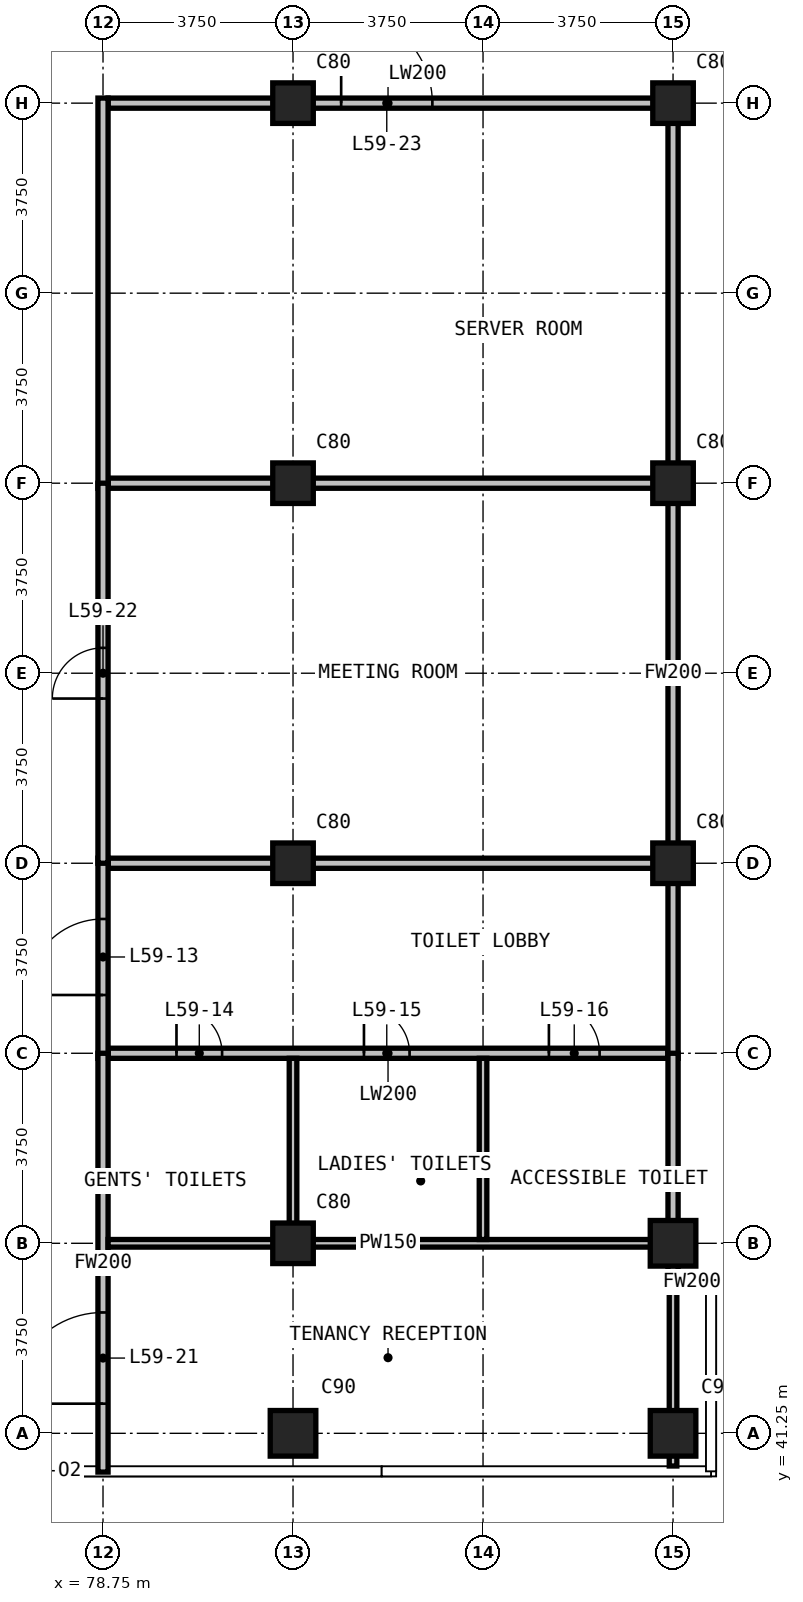
"""IFC4 building model, lengths in metres.
Left out: names, types, materials, properties, quantities, classifications, styles, units other than length and angle.
Written with IfcOpenShell. Run it as: python <this file> out.ifc"""

import sys

from ifc_helpers import new_model, si_unit, direction, frame, frame_2d, origin, origin_2d, place, context, subcontext, project, spatial, rectangle, extrude, element, fill, save


model = new_model("IFC4")
c1 = context("Model", 3, precision=1e-05, world=origin(), true_north=direction((0.0, 1.0)))
c2 = subcontext(c1, "Body", "Model", "MODEL_VIEW")
j1 = project(units=[si_unit("LENGTHUNIT", "METRE"), si_unit("PLANEANGLEUNIT", "RADIAN")], contexts=[c1])
p1 = place(None, origin())
s1 = spatial("IfcSite", under=j1, at=p1, CompositionType="ELEMENT")
p2 = place(p1, origin())
s2 = spatial("IfcBuilding", under=s1, at=p2, CompositionType="ELEMENT")
p3 = place(p2, frame((0.0, 0.0, 228.3)))
s3 = spatial("IfcBuildingStorey", under=s2, at=p3, CompositionType="ELEMENT", Elevation=228.3)
p4 = place(p3, frame((82.5, 41.25, 0.0), z_axis=(0.0, 0.0, 1.0), x_axis=(1.0, 0.0, 0.0)))
e1 = element("IfcColumn", 1, at=p4, inside=s3, PredefinedType="COLUMN", context=c2, shape_type="SweptSolid", body=[
    extrude(rectangle(XDim=0.9, YDim=0.9, at=origin_2d()), origin(), (0.0, 0.0, 1.0), 3.6),
])
for number, where, z_axis, x_axis in (
    (2, (82.5, 45.0, 0.0), (0.0, 0.0, 1.0), (1.0, 0.0, 0.0)),
    (3, (82.5, 52.5, 0.0), (0.0, 0.0, 1.0), (1.0, 0.0, 0.0)),
    (4, (82.5, 60.0, 0.0), (0.0, 0.0, 1.0), (1.0, 0.0, 0.0)),
    (5, (82.5, 67.5, 0.0), (0.0, 0.0, 1.0), (1.0, 0.0, 0.0)),
):
    element("IfcColumn", number, at=place(p3, frame(where, z_axis=z_axis, x_axis=x_axis)), inside=s3, PredefinedType="COLUMN", context=c2, shape_type="SweptSolid", body=[
        extrude(rectangle(XDim=0.8, YDim=0.8, at=origin_2d()), origin(), (0.0, 0.0, 1.0), 3.6),
    ])
for number, where, z_axis, x_axis in (
    (6, (90.0, 41.25, 0.0), (0.0, 0.0, 1.0), (1.0, 0.0, 0.0)),
    (7, (90.0, 45.0, 0.0), (0.0, 0.0, 1.0), (1.0, 0.0, 0.0)),
):
    element("IfcColumn", number, at=place(p3, frame(where, z_axis=z_axis, x_axis=x_axis)), inside=s3, PredefinedType="COLUMN", context=c2, shape_type="SweptSolid", body=[
        extrude(rectangle(XDim=0.9, YDim=0.9, at=origin_2d()), origin(), (0.0, 0.0, 1.0), 3.6),
    ])
for number, where, z_axis, x_axis in (
    (8, (90.0, 52.5, 0.0), (0.0, 0.0, 1.0), (1.0, 0.0, 0.0)),
    (9, (90.0, 60.0, 0.0), (0.0, 0.0, 1.0), (1.0, 0.0, 0.0)),
    (10, (90.0, 67.5, 0.0), (0.0, 0.0, 1.0), (1.0, 0.0, 0.0)),
):
    element("IfcColumn", number, at=place(p3, frame(where, z_axis=z_axis, x_axis=x_axis)), inside=s3, PredefinedType="COLUMN", context=c2, shape_type="SweptSolid", body=[
        extrude(rectangle(XDim=0.8, YDim=0.8, at=origin_2d()), origin(), (0.0, 0.0, 1.0), 3.6),
    ])
p5 = place(p3, frame((78.85, 48.75, 0.0), z_axis=(0.0, 0.0, 1.0), x_axis=(1.0, 0.0, 0.0)))
e11 = element("IfcWall", 11, at=p5, inside=s3, PredefinedType="PARTITIONING", context=c2, shape_type="SweptSolid", body=[
    extrude(rectangle(XDim=11.05, YDim=0.2, at=frame_2d((5.525, 0.0))), origin(), (0.0, 0.0, 1.0), 3.3),
])
p6 = place(p5, frame((1.35, 0.0, 0.0)))
e12 = element("IfcOpeningElement", 12, at=p6, cuts=e11, PredefinedType="OPENING", context=c2, shape_type="SweptSolid", body=[
    extrude(rectangle(XDim=0.9, YDim=2.2, at=frame_2d((0.45, 1.1))), frame((0.0, 0.11, 0.0), z_axis=(0.0, -1.0, 0.0), x_axis=(1.0, 0.0, 0.0)), (0.0, 0.0, 1.0), 0.22),
])
p7 = place(p5, frame((5.05, 0.0, 0.0)))
e13 = element("IfcOpeningElement", 13, at=p7, cuts=e11, PredefinedType="OPENING", context=c2, shape_type="SweptSolid", body=[
    extrude(rectangle(XDim=0.9, YDim=2.2, at=frame_2d((0.45, 1.1))), frame((0.0, 0.11, 0.0), z_axis=(0.0, -1.0, 0.0), x_axis=(1.0, 0.0, 0.0)), (0.0, 0.0, 1.0), 0.22),
])
p8 = place(p5, frame((8.7, 0.0, 0.0)))
e14 = element("IfcOpeningElement", 14, at=p8, cuts=e11, PredefinedType="OPENING", context=c2, shape_type="SweptSolid", body=[
    extrude(rectangle(XDim=1.0, YDim=2.2, at=frame_2d((0.5, 1.1))), frame((0.0, 0.11, 0.0), z_axis=(0.0, -1.0, 0.0), x_axis=(1.0, 0.0, 0.0)), (0.0, 0.0, 1.0), 0.22),
])
for number, where, z_axis, x_axis in (
    (15, (78.85, 52.5, 0.0), (0.0, 0.0, 1.0), (1.0, 0.0, 0.0)),
    (16, (78.85, 60.0, 0.0), (0.0, 0.0, 1.0), (1.0, 0.0, 0.0)),
):
    element("IfcWall", number, at=place(p3, frame(where, z_axis=z_axis, x_axis=x_axis)), inside=s3, PredefinedType="PARTITIONING", context=c2, shape_type="SweptSolid", body=[
        extrude(rectangle(XDim=11.05, YDim=0.2, at=frame_2d((5.525, 0.0))), origin(), (0.0, 0.0, 1.0), 3.3),
    ])
p9 = place(p3, frame((78.85, 67.5, 0.0), z_axis=(0.0, 0.0, 1.0), x_axis=(1.0, 0.0, 0.0)))
e17 = element("IfcWall", 17, at=p9, inside=s3, PredefinedType="PARTITIONING", context=c2, shape_type="SweptSolid", body=[
    extrude(rectangle(XDim=11.05, YDim=0.2, at=frame_2d((5.525, 0.0))), origin(), (0.0, 0.0, 1.0), 3.3),
])
p10 = place(p9, frame((4.6, 0.0, 0.0)))
e18 = element("IfcOpeningElement", 18, at=p10, cuts=e17, PredefinedType="OPENING", context=c2, shape_type="SweptSolid", body=[
    extrude(rectangle(XDim=1.8, YDim=2.4, at=frame_2d((0.9, 1.2))), frame((0.0, 0.11, 0.0), z_axis=(0.0, -1.0, 0.0), x_axis=(1.0, 0.0, 0.0)), (0.0, 0.0, 1.0), 0.22),
])
p11 = place(p3, frame((78.75, 48.65, 0.0), z_axis=(0.0, 0.0, 1.0), x_axis=(0.0, 1.0, 0.0)))
e19 = element("IfcWall", 19, at=p11, inside=s3, PredefinedType="PARTITIONING", context=c2, shape_type="SweptSolid", body=[
    extrude(rectangle(XDim=3.95, YDim=0.2, at=frame_2d((1.975, 0.0))), origin(), (0.0, 0.0, 1.0), 3.3),
])
p12 = place(p11, frame((1.25, 0.0, 0.0)))
e20 = element("IfcOpeningElement", 20, at=p12, cuts=e19, PredefinedType="OPENING", context=c2, shape_type="SweptSolid", body=[
    extrude(rectangle(XDim=1.5, YDim=2.2, at=frame_2d((0.75, 1.1))), frame((0.0, 0.11, 0.0), z_axis=(0.0, -1.0, 0.0), x_axis=(1.0, 0.0, 0.0)), (0.0, 0.0, 1.0), 0.22),
])
p13 = place(p3, frame((78.75, 59.9, 0.0), z_axis=(0.0, 0.0, 1.0), x_axis=(0.0, 1.0, 0.0)))
e21 = element("IfcWall", 21, at=p13, inside=s3, PredefinedType="PARTITIONING", context=c2, shape_type="SweptSolid", body=[
    extrude(rectangle(XDim=7.7, YDim=0.2, at=frame_2d((3.85, 0.0))), origin(), (0.0, 0.0, 1.0), 3.3),
])
p14 = place(p3, frame((90.0, 48.65, 0.0), z_axis=(0.0, 0.0, 1.0), x_axis=(0.0, 1.0, 0.0)))
e22 = element("IfcWall", 22, at=p14, inside=s3, PredefinedType="PARTITIONING", context=c2, shape_type="SweptSolid", body=[
    extrude(rectangle(XDim=3.95, YDim=0.2, at=frame_2d((1.975, 0.0))), origin(), (0.0, 0.0, 1.0), 3.3),
])
p15 = place(p3, frame((90.0, 59.9, 0.0), z_axis=(0.0, 0.0, 1.0), x_axis=(0.0, 1.0, 0.0)))
e23 = element("IfcWall", 23, at=p15, inside=s3, PredefinedType="PARTITIONING", context=c2, shape_type="SweptSolid", body=[
    extrude(rectangle(XDim=7.7, YDim=0.2, at=frame_2d((3.85, 0.0))), origin(), (0.0, 0.0, 1.0), 3.3),
])
p16 = place(p3, frame((90.1, 44.235, 0.0), z_axis=(0.0, 0.0, 1.0), x_axis=(1.0, 0.0, 0.0)))
e24 = element("IfcWall", 24, at=p16, inside=s3, PredefinedType="PARTITIONING", context=c2, shape_type="SweptSolid", body=[
    extrude(rectangle(XDim=0.545, YDim=0.2, at=frame_2d((0.272, 0.0))), origin(), (0.0, 0.0, 1.0), 3.3),
])
p17 = place(p3, frame((78.75, 40.485, 0.0), z_axis=(0.0, 0.0, 1.0), x_axis=(0.0, 1.0, 0.0)))
e25 = element("IfcWall", 25, at=p17, inside=s3, PredefinedType="PARTITIONING", context=c2, shape_type="SweptSolid", body=[
    extrude(rectangle(XDim=8.265, YDim=0.2, at=frame_2d((4.132, 0.0))), origin(), (0.0, 0.0, 1.0), 3.3),
])
p18 = place(p17, frame((1.35, 0.0, 0.0)))
e26 = element("IfcOpeningElement", 26, at=p18, cuts=e25, PredefinedType="OPENING", context=c2, shape_type="SweptSolid", body=[
    extrude(rectangle(XDim=1.8, YDim=2.2, at=frame_2d((0.9, 1.1))), frame((0.0, 0.11, 0.0), z_axis=(0.0, -1.0, 0.0), x_axis=(1.0, 0.0, 0.0)), (0.0, 0.0, 1.0), 0.22),
])
p19 = place(p3, frame((78.75, 52.5, 0.0), z_axis=(0.0, 0.0, 1.0), x_axis=(0.0, 1.0, 0.0)))
e27 = element("IfcWall", 27, at=p19, inside=s3, PredefinedType="PARTITIONING", context=c2, shape_type="SweptSolid", body=[
    extrude(rectangle(XDim=7.5, YDim=0.2, at=frame_2d((3.75, 0.0))), origin(), (0.0, 0.0, 1.0), 3.3),
])
p20 = place(p19, frame((3.25, 0.0, 0.0)))
e28 = element("IfcOpeningElement", 28, at=p20, cuts=e27, PredefinedType="OPENING", context=c2, shape_type="SweptSolid", body=[
    extrude(rectangle(XDim=1.0, YDim=2.2, at=frame_2d((0.5, 1.1))), frame((0.0, 0.11, 0.0), z_axis=(0.0, -1.0, 0.0), x_axis=(1.0, 0.0, 0.0)), (0.0, 0.0, 1.0), 0.22),
])
p21 = place(p3, frame((90.0, 44.135, 0.0), z_axis=(0.0, 0.0, 1.0), x_axis=(0.0, 1.0, 0.0)))
e29 = element("IfcWall", 29, at=p21, inside=s3, PredefinedType="PARTITIONING", context=c2, shape_type="SweptSolid", body=[
    extrude(rectangle(XDim=4.615, YDim=0.2, at=frame_2d((2.308, 0.0))), origin(), (0.0, 0.0, 1.0), 3.3),
])
p22 = place(p3, frame((90.0, 52.5, 0.0), z_axis=(0.0, 0.0, 1.0), x_axis=(0.0, 1.0, 0.0)))
e30 = element("IfcWall", 30, at=p22, inside=s3, PredefinedType="PARTITIONING", context=c2, shape_type="SweptSolid", body=[
    extrude(rectangle(XDim=7.5, YDim=0.2, at=frame_2d((3.75, 0.0))), origin(), (0.0, 0.0, 1.0), 3.3),
])
p23 = place(p3, frame((78.85, 45.0, 0.0), z_axis=(0.0, 0.0, 1.0), x_axis=(1.0, 0.0, 0.0)))
e31 = element("IfcWall", 31, at=p23, inside=s3, PredefinedType="PARTITIONING", context=c2, shape_type="SweptSolid", body=[
    extrude(rectangle(XDim=11.05, YDim=0.15, at=frame_2d((5.525, 0.0))), origin(), (0.0, 0.0, 1.0), 3.3),
])
for number, where, z_axis, x_axis in (
    (32, (82.5, 45.075, 0.0), (0.0, 0.0, 1.0), (0.0, 1.0, 0.0)),
    (33, (86.25, 45.075, 0.0), (0.0, 0.0, 1.0), (0.0, 1.0, 0.0)),
):
    element("IfcWall", number, at=place(p3, frame(where, z_axis=z_axis, x_axis=x_axis)), inside=s3, PredefinedType="PARTITIONING", context=c2, shape_type="SweptSolid", body=[
        extrude(rectangle(XDim=3.575, YDim=0.15, at=frame_2d((1.788, 0.0))), origin(), (0.0, 0.0, 1.0), 3.3),
    ])
p24 = place(p3, frame((90.0, 40.605, 0.0), z_axis=(0.0, 0.0, 1.0), x_axis=(0.0, 1.0, 0.0)))
e34 = element("IfcWall", 34, at=p24, inside=s3, PredefinedType="PARTITIONING", context=c2, shape_type="SweptSolid", body=[
    extrude(rectangle(XDim=3.6, YDim=0.15, at=frame_2d((1.8, 0.0))), origin(), (0.0, 0.0, 1.0), 3.3),
])
p25 = place(p12, origin())
e35 = element("IfcDoor", 35, at=p25, inside=s3, OperationType="DOUBLE_DOOR_SINGLE_SWING", PredefinedType="DOOR", context=c2, shape_type="SweptSolid", body=[
    extrude(rectangle(XDim=1.5, YDim=2.2, at=frame_2d((0.75, 1.1))), frame((0.0, 0.025, 0.0), z_axis=(0.0, -1.0, 0.0), x_axis=(1.0, 0.0, 0.0)), (0.0, 0.0, 1.0), 0.05),
])
fill(e20, e35)
p26 = place(p6, origin())
e36 = element("IfcDoor", 36, at=p26, inside=s3, OperationType="SINGLE_SWING_LEFT", PredefinedType="DOOR", context=c2, shape_type="SweptSolid", body=[
    extrude(rectangle(XDim=0.9, YDim=2.2, at=frame_2d((0.45, 1.1))), frame((0.0, 0.025, 0.0), z_axis=(0.0, -1.0, 0.0), x_axis=(1.0, 0.0, 0.0)), (0.0, 0.0, 1.0), 0.05),
])
fill(e12, e36)
p27 = place(p7, origin())
e37 = element("IfcDoor", 37, at=p27, inside=s3, OperationType="SINGLE_SWING_LEFT", PredefinedType="DOOR", context=c2, shape_type="SweptSolid", body=[
    extrude(rectangle(XDim=0.9, YDim=2.2, at=frame_2d((0.45, 1.1))), frame((0.0, 0.025, 0.0), z_axis=(0.0, -1.0, 0.0), x_axis=(1.0, 0.0, 0.0)), (0.0, 0.0, 1.0), 0.05),
])
fill(e13, e37)
p28 = place(p8, origin())
e38 = element("IfcDoor", 38, at=p28, inside=s3, OperationType="SINGLE_SWING_LEFT", PredefinedType="DOOR", context=c2, shape_type="SweptSolid", body=[
    extrude(rectangle(XDim=1.0, YDim=2.2, at=frame_2d((0.5, 1.1))), frame((0.0, 0.025, 0.0), z_axis=(0.0, -1.0, 0.0), x_axis=(1.0, 0.0, 0.0)), (0.0, 0.0, 1.0), 0.05),
])
fill(e14, e38)
p29 = place(p18, origin())
e39 = element("IfcDoor", 39, at=p29, inside=s3, OperationType="DOUBLE_DOOR_SINGLE_SWING", PredefinedType="DOOR", context=c2, shape_type="SweptSolid", body=[
    extrude(rectangle(XDim=1.8, YDim=2.2, at=frame_2d((0.9, 1.1))), frame((0.0, 0.025, 0.0), z_axis=(0.0, -1.0, 0.0), x_axis=(1.0, 0.0, 0.0)), (0.0, 0.0, 1.0), 0.05),
])
fill(e26, e39)
p30 = place(p20, origin())
e40 = element("IfcDoor", 40, at=p30, inside=s3, OperationType="SINGLE_SWING_LEFT", PredefinedType="DOOR", context=c2, shape_type="SweptSolid", body=[
    extrude(rectangle(XDim=1.0, YDim=2.2, at=frame_2d((0.5, 1.1))), frame((0.0, 0.025, 0.0), z_axis=(0.0, -1.0, 0.0), x_axis=(1.0, 0.0, 0.0)), (0.0, 0.0, 1.0), 0.05),
])
fill(e28, e40)
p31 = place(p10, origin())
e41 = element("IfcDoor", 41, at=p31, inside=s3, OperationType="DOUBLE_DOOR_SINGLE_SWING", PredefinedType="DOOR", context=c2, shape_type="SweptSolid", body=[
    extrude(rectangle(XDim=1.8, YDim=2.4, at=frame_2d((0.9, 1.2))), frame((0.0, 0.025, 0.0), z_axis=(0.0, -1.0, 0.0), x_axis=(1.0, 0.0, 0.0)), (0.0, 0.0, 1.0), 0.05),
])
fill(e18, e41)
save(model, sys.argv[1])
